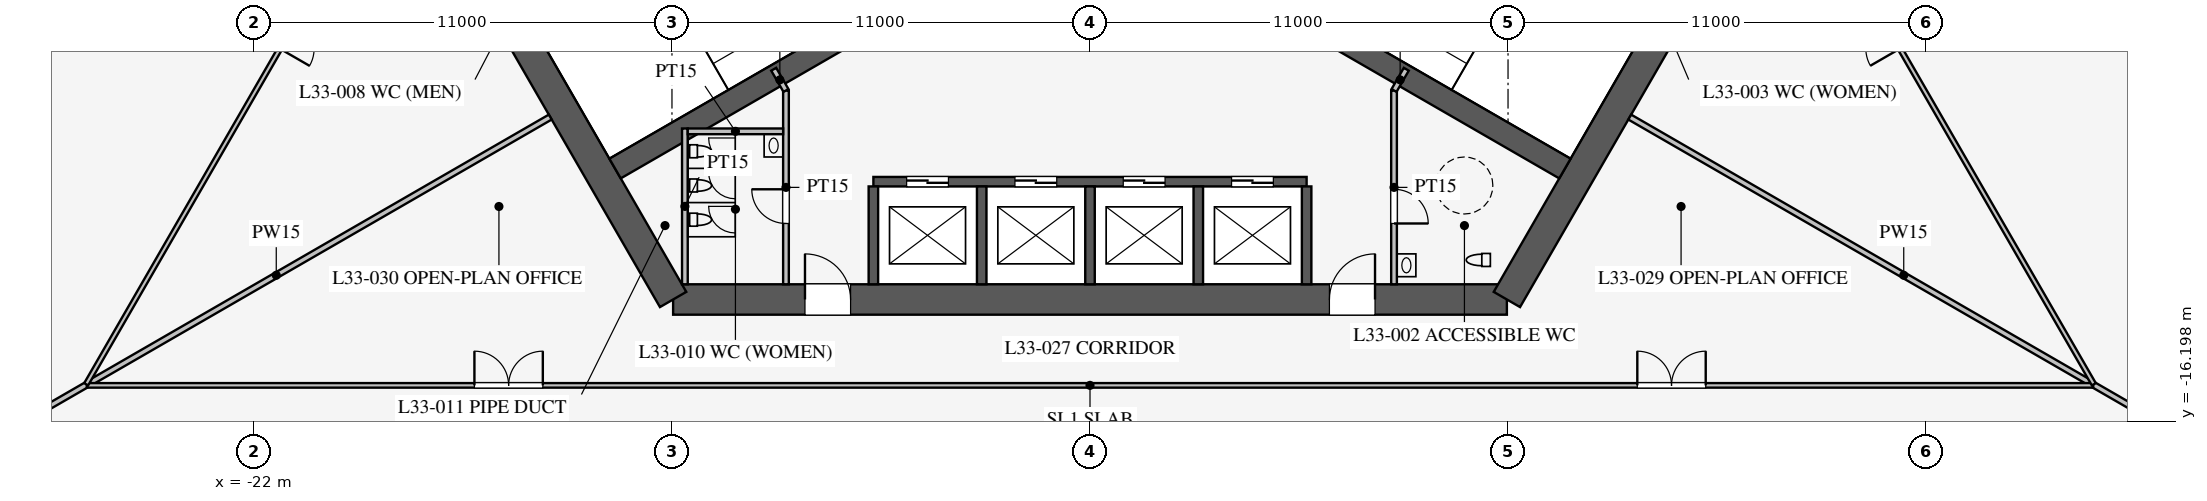
"""IFC4 building model, lengths in metres.
Left out: names, types, materials, properties, quantities, classifications, styles, units other than length and angle.
Written with IfcOpenShell. Run it as: python <this file> out.ifc"""

import sys

from ifc_helpers import new_model, si_unit, direction, frame, frame_2d, origin, place, context, subcontext, project, spatial, rectangle, extrude, element, fill, save


model = new_model("IFC4")
c1 = context("Model", 3, precision=1e-05, world=origin(), true_north=direction((0.0, 1.0)))
c2 = subcontext(c1, "Body", "Model", "MODEL_VIEW")
j1 = project(units=[si_unit("LENGTHUNIT", "METRE"), si_unit("PLANEANGLEUNIT", "RADIAN")], contexts=[c1])
p1 = place(None, origin())
s1 = spatial("IfcSite", under=j1, at=p1, CompositionType="ELEMENT")
p2 = place(p1, origin())
s2 = spatial("IfcBuilding", under=s1, at=p2, CompositionType="ELEMENT")
p3 = place(p2, frame((0.0, 0.0, 145.1)))
s3 = spatial("IfcBuildingStorey", under=s2, at=p3, CompositionType="ELEMENT", Elevation=145.1)
p4 = place(p3, frame((-10.97, -13.0, 0.0), z_axis=(0.0, 0.0, 1.0), x_axis=(1.0, 0.0, 0.0)))
e1 = element("IfcWall", 1, at=p4, inside=s3, PredefinedType="SHEAR", context=c2, shape_type="SweptSolid", body=[
    extrude(rectangle(XDim=21.939, YDim=0.8, at=frame_2d((10.97, 0.0))), origin(), (0.0, 0.0, 1.0), 4.2),
])
p5 = place(p4, frame((17.27, 0.0, 0.0)))
e2 = element("IfcOpeningElement", 2, at=p5, cuts=e1, PredefinedType="OPENING", context=c2, shape_type="SweptSolid", body=[
    extrude(rectangle(XDim=1.2, YDim=2.1, at=frame_2d((0.6, 1.05))), frame((0.0, 0.41, 0.0), z_axis=(0.0, -1.0, 0.0), x_axis=(1.0, 0.0, 0.0)), (0.0, 0.0, 1.0), 0.82),
])
p6 = place(p4, frame((3.47, 0.0, 0.0)))
e3 = element("IfcOpeningElement", 3, at=p6, cuts=e1, PredefinedType="OPENING", context=c2, shape_type="SweptSolid", body=[
    extrude(rectangle(XDim=1.2, YDim=2.1, at=frame_2d((0.6, 1.05))), frame((0.0, 0.41, 0.0), z_axis=(0.0, -1.0, 0.0), x_axis=(1.0, 0.0, 0.0)), (0.0, 0.0, 1.0), 0.82),
])
for number, where, z_axis, x_axis in (
    (4, (10.97, -13.0, 0.0), (0.0, 0.0, 1.0), (0.5, 0.866, 0.0)),
    (5, (-16.743, -3.0, 0.0), (0.0, 0.0, 1.0), (0.5, -0.866, 0.0)),
):
    element("IfcWall", number, at=place(p3, frame(where, z_axis=z_axis, x_axis=x_axis)), inside=s3, PredefinedType="SHEAR", context=c2, shape_type="SweptSolid", body=[
        extrude(rectangle(XDim=11.547, YDim=0.8, at=frame_2d((5.773, 0.0))), origin(), (0.0, 0.0, 1.0), 4.2),
    ])
p7 = place(p3, frame((-5.7, -9.9, 0.0), z_axis=(0.0, 0.0, 1.0), x_axis=(1.0, 0.0, 0.0)))
e6 = element("IfcWall", 6, at=p7, inside=s3, PredefinedType="SHEAR", context=c2, shape_type="SweptSolid", body=[
    extrude(rectangle(XDim=11.4, YDim=0.25, at=frame_2d((5.7, 0.0))), origin(), (0.0, 0.0, 1.0), 4.2),
])
p8 = place(p7, frame((0.875, 0.0, 0.0)))
e7 = element("IfcOpeningElement", 7, at=p8, cuts=e6, PredefinedType="OPENING", context=c2, shape_type="SweptSolid", body=[
    extrude(rectangle(XDim=1.1, YDim=2.2, at=frame_2d((0.55, 1.1))), frame((0.0, 0.135, 0.0), z_axis=(0.0, -1.0, 0.0), x_axis=(1.0, 0.0, 0.0)), (0.0, 0.0, 1.0), 0.27),
])
p9 = place(p7, frame((3.725, 0.0, 0.0)))
e8 = element("IfcOpeningElement", 8, at=p9, cuts=e6, PredefinedType="OPENING", context=c2, shape_type="SweptSolid", body=[
    extrude(rectangle(XDim=1.1, YDim=2.2, at=frame_2d((0.55, 1.1))), frame((0.0, 0.135, 0.0), z_axis=(0.0, -1.0, 0.0), x_axis=(1.0, 0.0, 0.0)), (0.0, 0.0, 1.0), 0.27),
])
p10 = place(p7, frame((6.575, 0.0, 0.0)))
e9 = element("IfcOpeningElement", 9, at=p10, cuts=e6, PredefinedType="OPENING", context=c2, shape_type="SweptSolid", body=[
    extrude(rectangle(XDim=1.1, YDim=2.2, at=frame_2d((0.55, 1.1))), frame((0.0, 0.135, 0.0), z_axis=(0.0, -1.0, 0.0), x_axis=(1.0, 0.0, 0.0)), (0.0, 0.0, 1.0), 0.27),
])
p11 = place(p7, frame((9.425, 0.0, 0.0)))
e10 = element("IfcOpeningElement", 10, at=p11, cuts=e6, PredefinedType="OPENING", context=c2, shape_type="SweptSolid", body=[
    extrude(rectangle(XDim=1.1, YDim=2.2, at=frame_2d((0.55, 1.1))), frame((0.0, 0.135, 0.0), z_axis=(0.0, -1.0, 0.0), x_axis=(1.0, 0.0, 0.0)), (0.0, 0.0, 1.0), 0.27),
])
for number, where, z_axis, x_axis in (
    (11, (-5.7, -10.025, 0.0), (0.0, 0.0, 1.0), (0.0, -1.0, 0.0)),
    (12, (-2.85, -10.025, 0.0), (0.0, 0.0, 1.0), (0.0, -1.0, 0.0)),
    (13, (0.0, -10.025, 0.0), (0.0, 0.0, 1.0), (0.0, -1.0, 0.0)),
    (14, (2.85, -10.025, 0.0), (0.0, 0.0, 1.0), (0.0, -1.0, 0.0)),
    (15, (5.7, -10.025, 0.0), (0.0, 0.0, 1.0), (0.0, -1.0, 0.0)),
):
    element("IfcWall", number, at=place(p3, frame(where, z_axis=z_axis, x_axis=x_axis)), inside=s3, PredefinedType="SHEAR", context=c2, shape_type="SweptSolid", body=[
        extrude(rectangle(XDim=2.575, YDim=0.25, at=frame_2d((1.288, 0.0))), origin(), (0.0, 0.0, 1.0), 4.2),
    ])
for number, where, z_axis, x_axis in (
    (16, (4.638, -5.016, 0.0), (0.0, 0.0, 1.0), (0.866, -0.5, 0.0)),
    (17, (-4.638, -5.016, 0.0), (0.0, 0.0, 1.0), (-0.866, -0.5, 0.0)),
):
    element("IfcWall", number, at=place(p3, frame(where, z_axis=z_axis, x_axis=x_axis)), inside=s3, PredefinedType="SHEAR", context=c2, shape_type="SweptSolid", body=[
        extrude(rectangle(XDim=9.075, YDim=0.6, at=frame_2d((4.538, 0.0))), origin(), (0.0, 0.0, 1.0), 4.2),
    ])
p12 = place(p3, frame((8.0, -7.5, 0.0), z_axis=(0.0, 0.0, 1.0), x_axis=(0.0, -1.0, 0.0)))
e18 = element("IfcWall", 18, at=p12, inside=s3, PredefinedType="PARTITIONING", context=c2, shape_type="SweptSolid", body=[
    extrude(rectangle(XDim=5.1, YDim=0.15, at=frame_2d((2.55, 0.0))), origin(), (0.0, 0.0, 1.0), 4.0),
])
p13 = place(p12, frame((2.6, 0.0, 0.0)))
e19 = element("IfcOpeningElement", 19, at=p13, cuts=e18, PredefinedType="OPENING", context=c2, shape_type="SweptSolid", body=[
    extrude(rectangle(XDim=0.9, YDim=2.1, at=frame_2d((0.45, 1.05))), frame((0.0, 0.085, 0.0), z_axis=(0.0, -1.0, 0.0), x_axis=(1.0, 0.0, 0.0)), (0.0, 0.0, 1.0), 0.17),
])
p14 = place(p3, frame((-8.0, -7.5, 0.0), z_axis=(0.0, 0.0, 1.0), x_axis=(0.0, -1.0, 0.0)))
e20 = element("IfcWall", 20, at=p14, inside=s3, PredefinedType="PARTITIONING", context=c2, shape_type="SweptSolid", body=[
    extrude(rectangle(XDim=5.1, YDim=0.15, at=frame_2d((2.55, 0.0))), origin(), (0.0, 0.0, 1.0), 4.0),
])
p15 = place(p14, frame((2.6, 0.0, 0.0)))
e21 = element("IfcOpeningElement", 21, at=p15, cuts=e20, PredefinedType="OPENING", context=c2, shape_type="SweptSolid", body=[
    extrude(rectangle(XDim=0.9, YDim=2.1, at=frame_2d((0.45, 1.05))), frame((0.0, 0.085, 0.0), z_axis=(0.0, -1.0, 0.0), x_axis=(1.0, 0.0, 0.0)), (0.0, 0.0, 1.0), 0.17),
])
for number, where, z_axis, x_axis in (
    (22, (8.0, -7.5, 0.0), (0.0, 0.0, 1.0), (0.5, 0.866, 0.0)),
    (23, (-8.0, -7.5, 0.0), (0.0, 0.0, 1.0), (-0.5, 0.866, 0.0)),
):
    element("IfcWall", number, at=place(p3, frame(where, z_axis=z_axis, x_axis=x_axis)), inside=s3, PredefinedType="PARTITIONING", context=c2, shape_type="SweptSolid", body=[
        extrude(rectangle(XDim=0.645, YDim=0.15, at=frame_2d((0.323, 0.0))), origin(), (0.0, 0.0, 1.0), 4.0),
    ])
p16 = place(p3, frame((-10.66, -8.5, 0.0), z_axis=(0.0, 0.0, 1.0), x_axis=(0.0, -1.0, 0.0)))
e24 = element("IfcWall", 24, at=p16, inside=s3, PredefinedType="PARTITIONING", context=c2, shape_type="SweptSolid", body=[
    extrude(rectangle(XDim=4.1, YDim=0.15, at=frame_2d((2.05, 0.0))), origin(), (0.0, 0.0, 1.0), 4.0),
])
p17 = place(p3, frame((-8.075, -8.575, 0.0), z_axis=(0.0, 0.0, 1.0), x_axis=(-1.0, 0.0, 0.0)))
e25 = element("IfcWall", 25, at=p17, inside=s3, PredefinedType="PARTITIONING", context=c2, shape_type="SweptSolid", body=[
    extrude(rectangle(XDim=2.51, YDim=0.15, at=frame_2d((1.255, 0.0))), origin(), (0.0, 0.0, 1.0), 4.0),
])
for number, where, z_axis, x_axis in (
    (26, (14.203, -8.2, 0.0), (0.0, 0.0, 1.0), (0.866, -0.5, 0.0)),
    (27, (-14.203, -8.2, 0.0), (0.0, 0.0, 1.0), (-0.866, -0.5, 0.0)),
):
    element("IfcWall", number, at=place(p3, frame(where, z_axis=z_axis, x_axis=x_axis)), inside=s3, PredefinedType="PARTITIONING", context=c2, shape_type="SweptSolid", body=[
        extrude(rectangle(XDim=16.65, YDim=0.15, at=frame_2d((8.325, 0.0))), origin(), (0.0, 0.0, 1.0), 2.3),
    ])
p18 = place(p3, frame((-26.398, -15.26, 0.0), z_axis=(0.0, 0.0, 1.0), x_axis=(1.0, 0.0, 0.0)))
e28 = element("IfcWall", 28, at=p18, inside=s3, PredefinedType="PARTITIONING", context=c2, shape_type="SweptSolid", body=[
    extrude(rectangle(XDim=52.796, YDim=0.12, at=frame_2d((26.398, 0.0))), origin(), (0.0, 0.0, 1.0), 2.9),
])
p19 = place(p18, frame((10.2, 0.0, 0.15)))
e29 = element("IfcOpeningElement", 29, at=p19, cuts=e28, PredefinedType="OPENING", context=c2, shape_type="SweptSolid", body=[
    extrude(rectangle(XDim=1.8, YDim=2.1, at=frame_2d((0.9, 1.05))), frame((0.0, 0.07, 0.0), z_axis=(0.0, -1.0, 0.0), x_axis=(1.0, 0.0, 0.0)), (0.0, 0.0, 1.0), 0.14),
])
p20 = place(p18, frame((40.8, 0.0, 0.15)))
e30 = element("IfcOpeningElement", 30, at=p20, cuts=e28, PredefinedType="OPENING", context=c2, shape_type="SweptSolid", body=[
    extrude(rectangle(XDim=1.8, YDim=2.1, at=frame_2d((0.9, 1.05))), frame((0.0, 0.07, 0.0), z_axis=(0.0, -1.0, 0.0), x_axis=(1.0, 0.0, 0.0)), (0.0, 0.0, 1.0), 0.14),
])
p21 = place(p3, frame((26.415, -15.231, 0.0), z_axis=(0.0, 0.0, 1.0), x_axis=(-0.50000091641, 0.866024874695, 0.0)))
e31 = element("IfcWall", 31, at=p21, inside=s3, PredefinedType="PARTITIONING", context=c2, shape_type="SweptSolid", body=[
    extrude(rectangle(XDim=52.796, YDim=0.12, at=frame_2d((26.398, 0.0))), origin(), (0.0, 0.0, 1.0), 2.9),
])
p22 = place(p21, frame((10.2, 0.0, 0.15)))
e32 = element("IfcOpeningElement", 32, at=p22, cuts=e31, PredefinedType="OPENING", context=c2, shape_type="SweptSolid", body=[
    extrude(rectangle(XDim=1.8, YDim=2.1, at=frame_2d((0.9, 1.05))), frame((0.0, 0.07, 0.0), z_axis=(0.0, -1.0, 0.0), x_axis=(1.0, 0.0, 0.0)), (0.0, 0.0, 1.0), 0.14),
])
p23 = place(p21, frame((40.8, 0.0, 0.15)))
e33 = element("IfcOpeningElement", 33, at=p23, cuts=e31, PredefinedType="OPENING", context=c2, shape_type="SweptSolid", body=[
    extrude(rectangle(XDim=1.8, YDim=2.1, at=frame_2d((0.9, 1.05))), frame((0.0, 0.07, 0.0), z_axis=(0.0, -1.0, 0.0), x_axis=(1.0, 0.0, 0.0)), (0.0, 0.0, 1.0), 0.14),
])
p24 = place(p3, frame((-0.016, 30.491, 0.0), z_axis=(0.0, 0.0, 1.0), x_axis=(-0.50000091641, -0.866024874695, 0.0)))
e34 = element("IfcWall", 34, at=p24, inside=s3, PredefinedType="PARTITIONING", context=c2, shape_type="SweptSolid", body=[
    extrude(rectangle(XDim=52.796, YDim=0.12, at=frame_2d((26.398, 0.0))), origin(), (0.0, 0.0, 1.0), 2.9),
])
p25 = place(p24, frame((10.2, 0.0, 0.15)))
e35 = element("IfcOpeningElement", 35, at=p25, cuts=e34, PredefinedType="OPENING", context=c2, shape_type="SweptSolid", body=[
    extrude(rectangle(XDim=1.8, YDim=2.1, at=frame_2d((0.9, 1.05))), frame((0.0, 0.07, 0.0), z_axis=(0.0, -1.0, 0.0), x_axis=(1.0, 0.0, 0.0)), (0.0, 0.0, 1.0), 0.14),
])
p26 = place(p24, frame((40.8, 0.0, 0.15)))
e36 = element("IfcOpeningElement", 36, at=p26, cuts=e34, PredefinedType="OPENING", context=c2, shape_type="SweptSolid", body=[
    extrude(rectangle(XDim=1.8, YDim=2.1, at=frame_2d((0.9, 1.05))), frame((0.0, 0.07, 0.0), z_axis=(0.0, -1.0, 0.0), x_axis=(1.0, 0.0, 0.0)), (0.0, 0.0, 1.0), 0.14),
])
p27 = place(p13, origin())
e37 = element("IfcDoor", 37, at=p27, inside=s3, OperationType="SINGLE_SWING_RIGHT", PredefinedType="DOOR", context=c2, shape_type="SweptSolid", body=[
    extrude(rectangle(XDim=0.9, YDim=2.1, at=frame_2d((0.45, 1.05))), frame((0.0, 0.025, 0.0), z_axis=(0.0, -1.0, 0.0), x_axis=(1.0, 0.0, 0.0)), (0.0, 0.0, 1.0), 0.05),
])
fill(e19, e37)
p28 = place(p15, frame((0.9, 0.0, 0.0), z_axis=(0.0, 0.0, 1.0), x_axis=(-1.0, 0.0, 0.0)))
e38 = element("IfcDoor", 38, at=p28, inside=s3, OperationType="SINGLE_SWING_RIGHT", PredefinedType="DOOR", context=c2, shape_type="SweptSolid", body=[
    extrude(rectangle(XDim=0.9, YDim=2.1, at=frame_2d((0.45, 1.05))), frame((0.0, 0.025, 0.0), z_axis=(0.0, -1.0, 0.0), x_axis=(1.0, 0.0, 0.0)), (0.0, 0.0, 1.0), 0.05),
])
fill(e21, e38)
p29 = place(p5, origin())
e39 = element("IfcDoor", 39, at=p29, inside=s3, OperationType="SINGLE_SWING_RIGHT", PredefinedType="DOOR", context=c2, shape_type="SweptSolid", body=[
    extrude(rectangle(XDim=1.2, YDim=2.1, at=frame_2d((0.6, 1.05))), frame((0.0, 0.025, 0.0), z_axis=(0.0, -1.0, 0.0), x_axis=(1.0, 0.0, 0.0)), (0.0, 0.0, 1.0), 0.05),
])
fill(e2, e39)
p30 = place(p6, origin())
e40 = element("IfcDoor", 40, at=p30, inside=s3, OperationType="SINGLE_SWING_LEFT", PredefinedType="DOOR", context=c2, shape_type="SweptSolid", body=[
    extrude(rectangle(XDim=1.2, YDim=2.1, at=frame_2d((0.6, 1.05))), frame((0.0, 0.025, 0.0), z_axis=(0.0, -1.0, 0.0), x_axis=(1.0, 0.0, 0.0)), (0.0, 0.0, 1.0), 0.05),
])
fill(e3, e40)
p31 = place(p19, origin())
e41 = element("IfcDoor", 41, at=p31, inside=s3, OperationType="DOUBLE_DOOR_SINGLE_SWING", PredefinedType="DOOR", context=c2, shape_type="SweptSolid", body=[
    extrude(rectangle(XDim=1.8, YDim=2.1, at=frame_2d((0.9, 1.05))), frame((0.0, 0.025, 0.0), z_axis=(0.0, -1.0, 0.0), x_axis=(1.0, 0.0, 0.0)), (0.0, 0.0, 1.0), 0.05),
])
fill(e29, e41)
p32 = place(p20, origin())
e42 = element("IfcDoor", 42, at=p32, inside=s3, OperationType="DOUBLE_DOOR_SINGLE_SWING", PredefinedType="DOOR", context=c2, shape_type="SweptSolid", body=[
    extrude(rectangle(XDim=1.8, YDim=2.1, at=frame_2d((0.9, 1.05))), frame((0.0, 0.025, 0.0), z_axis=(0.0, -1.0, 0.0), x_axis=(1.0, 0.0, 0.0)), (0.0, 0.0, 1.0), 0.05),
])
fill(e30, e42)
p33 = place(p8, origin())
e43 = element("IfcDoor", 43, at=p33, inside=s3, OperationType="DOUBLE_DOOR_SLIDING", PredefinedType="DOOR", context=c2, shape_type="SweptSolid", body=[
    extrude(rectangle(XDim=1.1, YDim=2.2, at=frame_2d((0.55, 1.1))), frame((0.0, 0.025, 0.0), z_axis=(0.0, -1.0, 0.0), x_axis=(1.0, 0.0, 0.0)), (0.0, 0.0, 1.0), 0.05),
])
fill(e7, e43)
p34 = place(p9, origin())
e44 = element("IfcDoor", 44, at=p34, inside=s3, OperationType="DOUBLE_DOOR_SLIDING", PredefinedType="DOOR", context=c2, shape_type="SweptSolid", body=[
    extrude(rectangle(XDim=1.1, YDim=2.2, at=frame_2d((0.55, 1.1))), frame((0.0, 0.025, 0.0), z_axis=(0.0, -1.0, 0.0), x_axis=(1.0, 0.0, 0.0)), (0.0, 0.0, 1.0), 0.05),
])
fill(e8, e44)
p35 = place(p10, origin())
e45 = element("IfcDoor", 45, at=p35, inside=s3, OperationType="DOUBLE_DOOR_SLIDING", PredefinedType="DOOR", context=c2, shape_type="SweptSolid", body=[
    extrude(rectangle(XDim=1.1, YDim=2.2, at=frame_2d((0.55, 1.1))), frame((0.0, 0.025, 0.0), z_axis=(0.0, -1.0, 0.0), x_axis=(1.0, 0.0, 0.0)), (0.0, 0.0, 1.0), 0.05),
])
fill(e9, e45)
p36 = place(p11, origin())
e46 = element("IfcDoor", 46, at=p36, inside=s3, OperationType="DOUBLE_DOOR_SLIDING", PredefinedType="DOOR", context=c2, shape_type="SweptSolid", body=[
    extrude(rectangle(XDim=1.1, YDim=2.2, at=frame_2d((0.55, 1.1))), frame((0.0, 0.025, 0.0), z_axis=(0.0, -1.0, 0.0), x_axis=(1.0, 0.0, 0.0)), (0.0, 0.0, 1.0), 0.05),
])
fill(e10, e46)
save(model, sys.argv[1])
